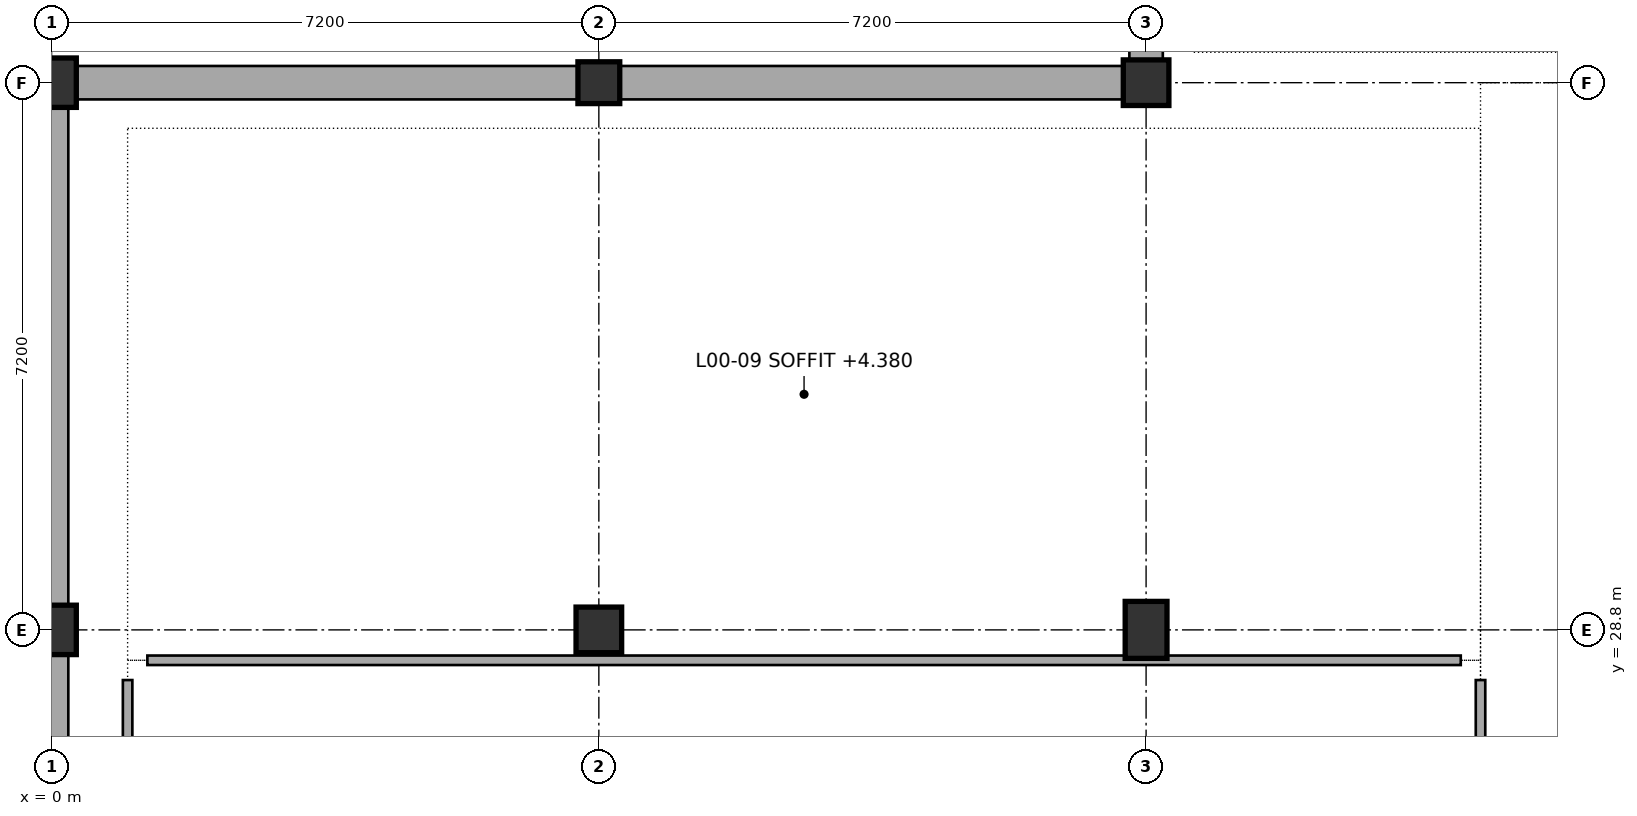
"""IFC4 building model, lengths in metres.
Left out: names, types, materials, properties, quantities, classifications, styles, units other than length and angle.
Written with IfcOpenShell. Run it as: python <this file> out.ifc"""

import sys

from ifc_helpers import new_model, si_unit, direction, frame, frame_2d, origin, origin_2d, place, context, subcontext, project, spatial, rectangle, circle, extrude, element, fill, save


model = new_model("IFC4")
c1 = context("Model", 3, precision=1e-05, world=origin(), true_north=direction((0.0, 1.0)))
c2 = subcontext(c1, "Body", "Model", "MODEL_VIEW")
j1 = project(units=[si_unit("LENGTHUNIT", "METRE"), si_unit("PLANEANGLEUNIT", "RADIAN")], contexts=[c1])
p1 = place(None, origin())
s1 = spatial("IfcSite", under=j1, at=p1, CompositionType="ELEMENT")
p2 = place(p1, origin())
s2 = spatial("IfcBuilding", under=s1, at=p2, CompositionType="ELEMENT")
p3 = place(p2, origin())
s3 = spatial("IfcBuildingStorey", under=s2, at=p3, CompositionType="ELEMENT", Elevation=0.0)
for number, where, z_axis, x_axis in (
    (1, (0.0, 28.8, 0.0), (0.0, 0.0, 1.0), (1.0, 0.0, 0.0)),
    (2, (0.0, 36.0, 0.0), (0.0, 0.0, 1.0), (1.0, 0.0, 0.0)),
):
    element("IfcColumn", number, at=place(p3, frame(where, z_axis=z_axis, x_axis=x_axis)), inside=s3, PredefinedType="COLUMN", context=c2, shape_type="SweptSolid", body=[
        extrude(circle(Radius=0.325, at=origin_2d()), origin(), (0.0, 0.0, 1.0), 4.8),
    ])
p4 = place(p3, frame((7.2, 28.8, 0.0), z_axis=(0.0, 0.0, 1.0), x_axis=(1.0, 0.0, 0.0)))
e3 = element("IfcColumn", 3, at=p4, inside=s3, PredefinedType="COLUMN", context=c2, shape_type="SweptSolid", body=[
    extrude(rectangle(XDim=0.6, YDim=0.6, at=origin_2d()), origin(), (0.0, 0.0, 1.0), 4.8),
])
p5 = place(p3, frame((7.2, 36.0, 0.0), z_axis=(0.0, 0.0, 1.0), x_axis=(1.0, 0.0, 0.0)))
e4 = element("IfcColumn", 4, at=p5, inside=s3, PredefinedType="COLUMN", context=c2, shape_type="SweptSolid", body=[
    extrude(rectangle(XDim=0.55, YDim=0.55, at=origin_2d()), origin(), (0.0, 0.0, 1.0), 4.8),
])
p6 = place(p3, frame((14.4, 28.8, 0.0), z_axis=(0.0, 0.0, 1.0), x_axis=(1.0, 0.0, 0.0)))
e5 = element("IfcColumn", 5, at=p6, inside=s3, PredefinedType="COLUMN", context=c2, shape_type="SweptSolid", body=[
    extrude(rectangle(XDim=0.55, YDim=0.75, at=origin_2d()), origin(), (0.0, 0.0, 1.0), 4.8),
])
p7 = place(p3, frame((14.4, 36.0, 0.0), z_axis=(0.0, 0.0, 1.0), x_axis=(1.0, 0.0, 0.0)))
e6 = element("IfcColumn", 6, at=p7, inside=s3, PredefinedType="COLUMN", context=c2, shape_type="SweptSolid", body=[
    extrude(rectangle(XDim=0.6, YDim=0.6, at=origin_2d()), origin(), (0.0, 0.0, 1.0), 4.8),
])
p8 = place(p3, frame((14.4, 36.0, 0.0), z_axis=(0.0, 0.0, 1.0), x_axis=(0.0, 1.0, 0.0)))
e7 = element("IfcWall", 7, at=p8, inside=s3, PredefinedType="STANDARD", context=c2, shape_type="SweptSolid", body=[
    extrude(rectangle(XDim=7.2, YDim=0.44, at=frame_2d((3.6, 0.0))), origin(), (0.0, 0.0, 1.0), 4.44),
])
p9 = place(p8, frame((2.4, 0.0, 0.0)))
e8 = element("IfcOpeningElement", 8, at=p9, cuts=e7, PredefinedType="OPENING", context=c2, shape_type="SweptSolid", body=[
    extrude(rectangle(XDim=2.4, YDim=2.45, at=frame_2d((1.2, 1.225))), frame((0.0, 0.23, 0.0), z_axis=(0.0, -1.0, 0.0), x_axis=(1.0, 0.0, 0.0)), (0.0, 0.0, 1.0), 0.46),
])
p10 = place(p3, frame((0.0, 21.6, 0.0), z_axis=(0.0, 0.0, 1.0), x_axis=(0.0, 1.0, 0.0)))
e9 = element("IfcWall", 9, at=p10, inside=s3, PredefinedType="STANDARD", context=c2, shape_type="SweptSolid", body=[
    extrude(rectangle(XDim=7.2, YDim=0.44, at=frame_2d((3.6, 0.0))), origin(), (0.0, 0.0, 1.0), 4.44),
])
p11 = place(p10, frame((2.85, 0.0, 0.8)))
e10 = element("IfcOpeningElement", 10, at=p11, cuts=e9, PredefinedType="OPENING", context=c2, shape_type="SweptSolid", body=[
    extrude(rectangle(XDim=1.5, YDim=1.65, at=frame_2d((0.75, 0.825))), frame((0.0, 0.23, 0.0), z_axis=(0.0, -1.0, 0.0), x_axis=(1.0, 0.0, 0.0)), (0.0, 0.0, 1.0), 0.46),
])
p12 = place(p3, frame((0.0, 28.8, 0.0), z_axis=(0.0, 0.0, 1.0), x_axis=(0.0, 1.0, 0.0)))
e11 = element("IfcWall", 11, at=p12, inside=s3, PredefinedType="STANDARD", context=c2, shape_type="SweptSolid", body=[
    extrude(rectangle(XDim=7.2, YDim=0.44, at=frame_2d((3.6, 0.0))), origin(), (0.0, 0.0, 1.0), 4.44),
])
p13 = place(p12, frame((2.7, 0.0, 0.8)))
e12 = element("IfcOpeningElement", 12, at=p13, cuts=e11, PredefinedType="OPENING", context=c2, shape_type="SweptSolid", body=[
    extrude(rectangle(XDim=1.8, YDim=1.65, at=frame_2d((0.9, 0.825))), frame((0.0, 0.23, 0.0), z_axis=(0.0, -1.0, 0.0), x_axis=(1.0, 0.0, 0.0)), (0.0, 0.0, 1.0), 0.46),
])
p14 = place(p3, frame((0.0, 36.0, 0.0), z_axis=(0.0, 0.0, 1.0), x_axis=(1.0, 0.0, 0.0)))
e13 = element("IfcWall", 13, at=p14, inside=s3, PredefinedType="STANDARD", context=c2, shape_type="SweptSolid", body=[
    extrude(rectangle(XDim=7.2, YDim=0.44, at=frame_2d((3.6, 0.0))), origin(), (0.0, 0.0, 1.0), 4.44),
])
p15 = place(p14, frame((2.9, 0.0, 0.8)))
e14 = element("IfcOpeningElement", 14, at=p15, cuts=e13, PredefinedType="OPENING", context=c2, shape_type="SweptSolid", body=[
    extrude(rectangle(XDim=1.4, YDim=2.05, at=frame_2d((0.7, 1.025))), frame((0.0, 0.23, 0.0), z_axis=(0.0, -1.0, 0.0), x_axis=(1.0, 0.0, 0.0)), (0.0, 0.0, 1.0), 0.46),
])
p16 = place(p3, frame((7.2, 36.0, 0.0), z_axis=(0.0, 0.0, 1.0), x_axis=(1.0, 0.0, 0.0)))
e15 = element("IfcWall", 15, at=p16, inside=s3, PredefinedType="STANDARD", context=c2, shape_type="SweptSolid", body=[
    extrude(rectangle(XDim=7.2, YDim=0.44, at=frame_2d((3.6, 0.0))), origin(), (0.0, 0.0, 1.0), 4.44),
])
p17 = place(p16, frame((2.7, 0.0, 0.8)))
e16 = element("IfcOpeningElement", 16, at=p17, cuts=e15, PredefinedType="OPENING", context=c2, shape_type="SweptSolid", body=[
    extrude(rectangle(XDim=1.8, YDim=2.05, at=frame_2d((0.9, 1.025))), frame((0.0, 0.23, 0.0), z_axis=(0.0, -1.0, 0.0), x_axis=(1.0, 0.0, 0.0)), (0.0, 0.0, 1.0), 0.46),
])
p18 = place(p3, frame((18.8, 1.26, 0.0), z_axis=(0.0, 0.0, 1.0), x_axis=(0.0, 1.0, 0.0)))
e17 = element("IfcWall", 17, at=p18, inside=s3, PredefinedType="PARTITIONING", context=c2, shape_type="SweptSolid", body=[
    extrude(rectangle(XDim=26.88, YDim=0.125, at=frame_2d((13.44, 0.0))), origin(), (0.0, 0.0, 1.0), 4.44),
])
p19 = place(p18, frame((12.59, 0.0, 0.0)))
e18 = element("IfcOpeningElement", 18, at=p19, cuts=e17, PredefinedType="OPENING", context=c2, shape_type="SweptSolid", body=[
    extrude(rectangle(XDim=1.7, YDim=2.2, at=frame_2d((0.85, 1.1))), frame((0.0, 0.073, 0.0), z_axis=(0.0, -1.0, 0.0), x_axis=(1.0, 0.0, 0.0)), (0.0, 0.0, 1.0), 0.145),
])
p20 = place(p3, frame((18.54, 28.4, 0.0), z_axis=(0.0, 0.0, 1.0), x_axis=(-1.0, 0.0, 0.0)))
e19 = element("IfcWall", 19, at=p20, inside=s3, PredefinedType="PARTITIONING", context=c2, shape_type="SweptSolid", body=[
    extrude(rectangle(XDim=17.28, YDim=0.125, at=frame_2d((8.64, 0.0))), origin(), (0.0, 0.0, 1.0), 3.615),
])
p21 = place(p3, frame((1.0, 28.14, 0.0), z_axis=(0.0, 0.0, 1.0), x_axis=(0.0, -1.0, 0.0)))
e20 = element("IfcWall", 20, at=p21, inside=s3, PredefinedType="PARTITIONING", context=c2, shape_type="SweptSolid", body=[
    extrude(rectangle(XDim=26.88, YDim=0.125, at=frame_2d((13.44, 0.0))), origin(), (0.0, 0.0, 1.0), 4.44),
])
p22 = place(p13, origin())
e21 = element("IfcWindow", 21, at=p22, inside=s3, PartitioningType="SINGLE_PANEL", PredefinedType="WINDOW", context=c2, shape_type="SweptSolid", body=[
    extrude(rectangle(XDim=1.8, YDim=1.65, at=frame_2d((0.9, 0.825))), frame((0.0, 0.03, 0.0), z_axis=(0.0, -1.0, 0.0), x_axis=(1.0, 0.0, 0.0)), (0.0, 0.0, 1.0), 0.06),
])
fill(e12, e21)
p23 = place(p15, origin())
e22 = element("IfcWindow", 22, at=p23, inside=s3, PartitioningType="SINGLE_PANEL", PredefinedType="WINDOW", context=c2, shape_type="SweptSolid", body=[
    extrude(rectangle(XDim=1.4, YDim=2.05, at=frame_2d((0.7, 1.025))), frame((0.0, 0.03, 0.0), z_axis=(0.0, -1.0, 0.0), x_axis=(1.0, 0.0, 0.0)), (0.0, 0.0, 1.0), 0.06),
])
fill(e14, e22)
p24 = place(p17, origin())
e23 = element("IfcWindow", 23, at=p24, inside=s3, PartitioningType="SINGLE_PANEL", PredefinedType="WINDOW", context=c2, shape_type="SweptSolid", body=[
    extrude(rectangle(XDim=1.8, YDim=2.05, at=frame_2d((0.9, 1.025))), frame((0.0, 0.03, 0.0), z_axis=(0.0, -1.0, 0.0), x_axis=(1.0, 0.0, 0.0)), (0.0, 0.0, 1.0), 0.06),
])
fill(e16, e23)
save(model, sys.argv[1])
